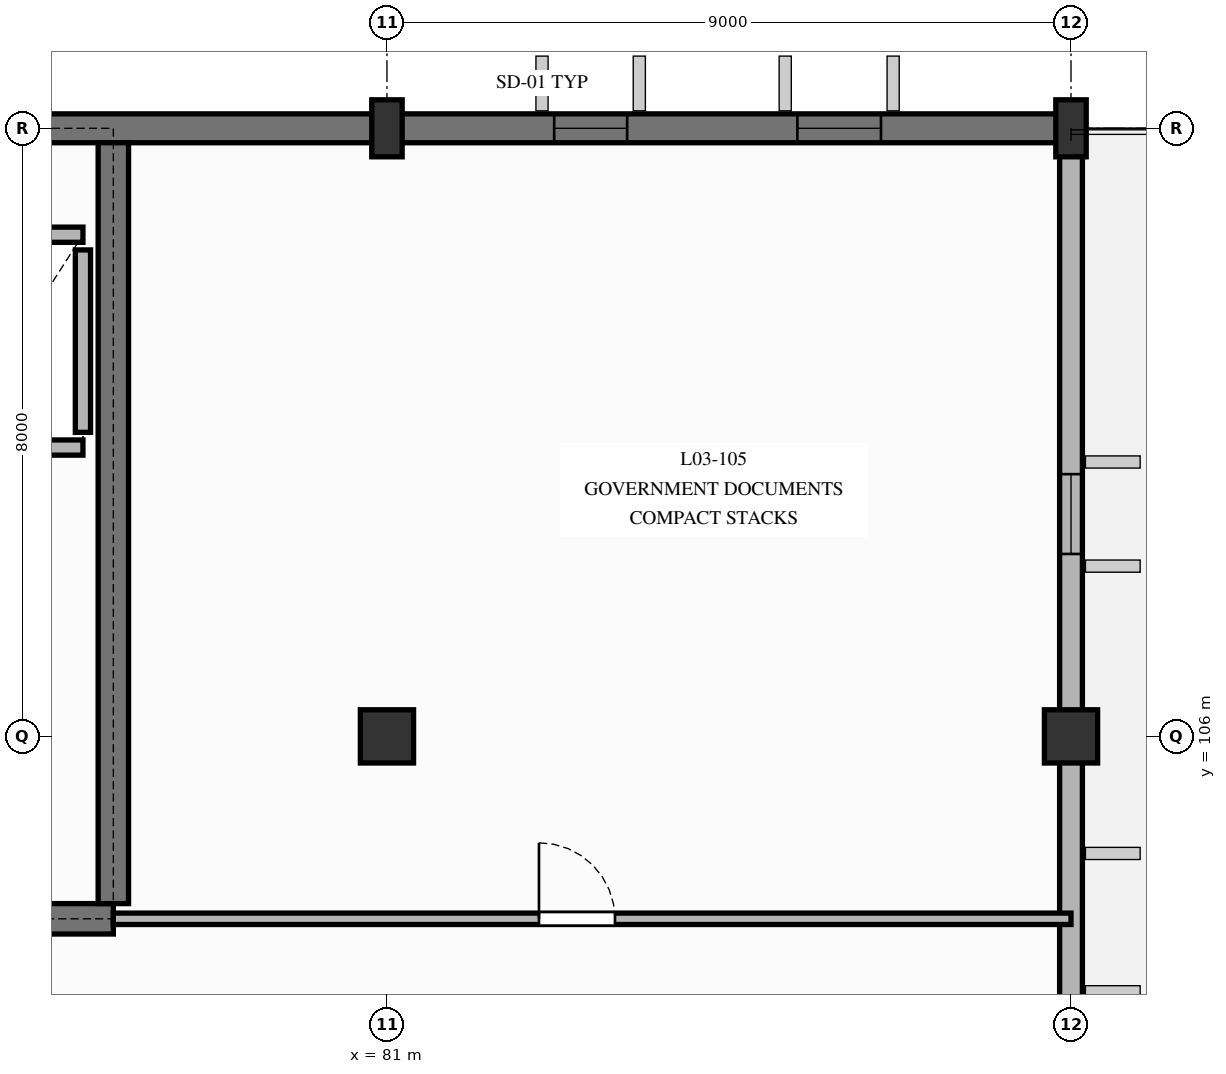
"""IFC4 building model, lengths in metres.
Left out: names, types, materials, properties, quantities, classifications, styles, units other than length and angle.
Written with IfcOpenShell. Run it as: python <this file> out.ifc"""

import sys

from ifc_helpers import new_model, si_unit, direction, frame, frame_2d, origin, origin_2d, place, context, subcontext, project, spatial, rectangle, extrude, element, fill, save


model = new_model("IFC4")
c1 = context("Model", 3, precision=1e-05, world=origin(), true_north=direction((0.0, 1.0)))
c2 = subcontext(c1, "Body", "Model", "MODEL_VIEW")
j1 = project(units=[si_unit("LENGTHUNIT", "METRE"), si_unit("PLANEANGLEUNIT", "RADIAN")], contexts=[c1])
p1 = place(None, origin())
s1 = spatial("IfcSite", under=j1, at=p1, CompositionType="ELEMENT")
p2 = place(p1, origin())
s2 = spatial("IfcBuilding", under=s1, at=p2, CompositionType="ELEMENT")
p3 = place(p2, frame((0.0, 0.0, 12.78)))
s3 = spatial("IfcBuildingStorey", under=s2, at=p3, CompositionType="ELEMENT", Elevation=12.78)
p4 = place(p3, frame((81.0, 106.0, 0.0), z_axis=(0.0, 0.0, 1.0), x_axis=(1.0, 0.0, 0.0)))
e1 = element("IfcColumn", 1, at=p4, inside=s3, PredefinedType="COLUMN", context=c2, shape_type="SweptSolid", body=[
    extrude(rectangle(XDim=0.7, YDim=0.7, at=origin_2d()), origin(), (0.0, 0.0, 1.0), 3.74),
])
p5 = place(p3, frame((81.0, 114.0, 0.0), z_axis=(0.0, 0.0, 1.0), x_axis=(0.0, 1.0, 0.0)))
e2 = element("IfcColumn", 2, at=p5, inside=s3, PredefinedType="COLUMN", context=c2, shape_type="SweptSolid", body=[
    extrude(rectangle(XDim=0.4, YDim=0.75, at=origin_2d()), origin(), (0.0, 0.0, 1.0), 3.74),
])
p6 = place(p3, frame((90.0, 106.0, 0.0), z_axis=(0.0, 0.0, 1.0), x_axis=(1.0, 0.0, 0.0)))
e3 = element("IfcColumn", 3, at=p6, inside=s3, PredefinedType="COLUMN", context=c2, shape_type="SweptSolid", body=[
    extrude(rectangle(XDim=0.7, YDim=0.7, at=origin_2d()), origin(), (0.0, 0.0, 1.0), 3.74),
])
p7 = place(p3, frame((90.0, 114.0, 0.0), z_axis=(0.0, 0.0, 1.0), x_axis=(0.0, 1.0, 0.0)))
e4 = element("IfcColumn", 4, at=p7, inside=s3, PredefinedType="COLUMN", context=c2, shape_type="SweptSolid", body=[
    extrude(rectangle(XDim=0.4, YDim=0.75, at=origin_2d()), origin(), (0.0, 0.0, 1.0), 3.74),
])
p8 = place(p3, frame((72.0, 114.0, 0.0), z_axis=(0.0, 0.0, 1.0), x_axis=(1.0, 0.0, 0.0)))
e5 = element("IfcWall", 5, at=p8, inside=s3, PredefinedType="SOLIDWALL", context=c2, shape_type="SweptSolid", body=[
    extrude(rectangle(XDim=9.0, YDim=0.38, at=frame_2d((4.5, 0.0))), origin(), (0.0, 0.0, 1.0), 3.42),
])
p9 = place(p3, frame((81.0, 114.0, 0.0), z_axis=(0.0, 0.0, 1.0), x_axis=(1.0, 0.0, 0.0)))
e6 = element("IfcWall", 6, at=p9, inside=s3, PredefinedType="SOLIDWALL", context=c2, shape_type="SweptSolid", body=[
    extrude(rectangle(XDim=9.0, YDim=0.38, at=frame_2d((4.5, 0.0))), origin(), (0.0, 0.0, 1.0), 3.42),
])
p10 = place(p9, frame((2.2, 0.0, 0.815)))
e7 = element("IfcOpeningElement", 7, at=p10, cuts=e6, PredefinedType="OPENING", context=c2, shape_type="SweptSolid", body=[
    extrude(rectangle(XDim=0.96, YDim=1.95, at=frame_2d((0.48, 0.975))), frame((0.0, 0.2, 0.0), z_axis=(0.0, -1.0, 0.0), x_axis=(1.0, 0.0, 0.0)), (0.0, 0.0, 1.0), 0.4),
])
p11 = place(p9, frame((5.4, 0.0, 1.05)))
e8 = element("IfcOpeningElement", 8, at=p11, cuts=e6, PredefinedType="OPENING", context=c2, shape_type="SweptSolid", body=[
    extrude(rectangle(XDim=1.1, YDim=1.65, at=frame_2d((0.55, 0.825))), frame((0.0, 0.2, 0.0), z_axis=(0.0, -1.0, 0.0), x_axis=(1.0, 0.0, 0.0)), (0.0, 0.0, 1.0), 0.4),
])
p12 = place(p3, frame((90.0, 95.6, 0.0), z_axis=(0.0, 0.0, 1.0), x_axis=(0.0, 1.0, 0.0)))
e9 = element("IfcWall", 9, at=p12, inside=s3, PredefinedType="SOLIDWALL", context=c2, shape_type="SweptSolid", body=[
    extrude(rectangle(XDim=18.4, YDim=0.3, at=frame_2d((9.2, 0.0))), origin(), (0.0, 0.0, 1.0), 2.805),
])
p13 = place(p12, frame((4.4, 0.0, 0.0)))
e10 = element("IfcOpeningElement", 10, at=p13, cuts=e9, PredefinedType="OPENING", context=c2, shape_type="SweptSolid", body=[
    extrude(rectangle(XDim=1.6, YDim=2.25, at=frame_2d((0.8, 1.125))), frame((0.0, 0.16, 0.0), z_axis=(0.0, -1.0, 0.0), x_axis=(1.0, 0.0, 0.0)), (0.0, 0.0, 1.0), 0.32),
])
p14 = place(p12, frame((12.8, 0.0, 0.935)))
e11 = element("IfcOpeningElement", 11, at=p14, cuts=e9, PredefinedType="OPENING", context=c2, shape_type="SweptSolid", body=[
    extrude(rectangle(XDim=1.05, YDim=1.75, at=frame_2d((0.525, 0.875))), frame((0.0, 0.16, 0.0), z_axis=(0.0, -1.0, 0.0), x_axis=(1.0, 0.0, 0.0)), (0.0, 0.0, 1.0), 0.32),
])
p15 = place(p3, frame((64.2, 103.6, 0.0), z_axis=(0.0, 0.0, 1.0), x_axis=(1.0, 0.0, 0.0)))
e12 = element("IfcWall", 12, at=p15, inside=s3, PredefinedType="SHEAR", context=c2, shape_type="SweptSolid", body=[
    extrude(rectangle(XDim=13.2, YDim=0.4, at=frame_2d((6.6, 0.0))), origin(), (0.0, 0.0, 1.0), 3.42),
])
p16 = place(p15, frame((5.8, 0.0, 0.0)))
e13 = element("IfcOpeningElement", 13, at=p16, cuts=e12, PredefinedType="OPENING", context=c2, shape_type="SweptSolid", body=[
    extrude(rectangle(XDim=1.5, YDim=2.2, at=frame_2d((0.75, 1.1))), frame((0.0, 0.21, 0.0), z_axis=(0.0, -1.0, 0.0), x_axis=(1.0, 0.0, 0.0)), (0.0, 0.0, 1.0), 0.42),
])
p17 = place(p3, frame((77.4, 103.8, 0.0), z_axis=(0.0, 0.0, 1.0), x_axis=(0.0, 1.0, 0.0)))
e14 = element("IfcWall", 14, at=p17, inside=s3, PredefinedType="SHEAR", context=c2, shape_type="SweptSolid", body=[
    extrude(rectangle(XDim=10.01, YDim=0.4, at=frame_2d((5.005, 0.0))), origin(), (0.0, 0.0, 1.0), 3.42),
])
p18 = place(p3, frame((75.2, 109.8, 0.0), z_axis=(0.0, 0.0, 1.0), x_axis=(1.0, 0.0, 0.0)))
e15 = element("IfcWall", 15, at=p18, inside=s3, PredefinedType="PARTITIONING", context=c2, shape_type="SweptSolid", body=[
    extrude(rectangle(XDim=1.8, YDim=0.2, at=frame_2d((0.9, 0.0))), origin(), (0.0, 0.0, 1.0), 3.42),
])
p19 = place(p18, frame((0.45, 0.0, 0.0)))
e16 = element("IfcOpeningElement", 16, at=p19, cuts=e15, PredefinedType="OPENING", context=c2, shape_type="SweptSolid", body=[
    extrude(rectangle(XDim=0.9, YDim=2.1, at=frame_2d((0.45, 1.05))), frame((0.0, 0.11, 0.0), z_axis=(0.0, -1.0, 0.0), x_axis=(1.0, 0.0, 0.0)), (0.0, 0.0, 1.0), 0.22),
])
p20 = place(p3, frame((75.2, 112.6, 0.0), z_axis=(0.0, 0.0, 1.0), x_axis=(1.0, 0.0, 0.0)))
e17 = element("IfcWall", 17, at=p20, inside=s3, PredefinedType="PARTITIONING", context=c2, shape_type="SweptSolid", body=[
    extrude(rectangle(XDim=1.8, YDim=0.2, at=frame_2d((0.9, 0.0))), origin(), (0.0, 0.0, 1.0), 3.42),
])
p21 = place(p3, frame((77.0, 110.0, 0.0), z_axis=(0.0, 0.0, 1.0), x_axis=(0.0, 1.0, 0.0)))
e18 = element("IfcWall", 18, at=p21, inside=s3, PredefinedType="PARTITIONING", context=c2, shape_type="SweptSolid", body=[
    extrude(rectangle(XDim=2.4, YDim=0.2, at=frame_2d((1.2, 0.0))), origin(), (0.0, 0.0, 1.0), 3.42),
])
p22 = place(p3, frame((77.4, 103.6, 0.0), z_axis=(0.0, 0.0, 1.0), x_axis=(1.0, 0.0, 0.0)))
e19 = element("IfcWall", 19, at=p22, inside=s3, PredefinedType="PARTITIONING", context=c2, shape_type="SweptSolid", body=[
    extrude(rectangle(XDim=12.6, YDim=0.15, at=frame_2d((6.3, 0.0))), origin(), (0.0, 0.0, 1.0), 3.42),
])
p23 = place(p22, frame((5.6, 0.0, 0.0)))
e20 = element("IfcOpeningElement", 20, at=p23, cuts=e19, PredefinedType="OPENING", context=c2, shape_type="SweptSolid", body=[
    extrude(rectangle(XDim=1.0, YDim=2.15, at=frame_2d((0.5, 1.075))), frame((0.0, 0.085, 0.0), z_axis=(0.0, -1.0, 0.0), x_axis=(1.0, 0.0, 0.0)), (0.0, 0.0, 1.0), 0.17),
])
p24 = place(p10, origin())
e21 = element("IfcWindow", 21, at=p24, inside=s3, PartitioningType="SINGLE_PANEL", PredefinedType="WINDOW", context=c2, shape_type="SweptSolid", body=[
    extrude(rectangle(XDim=0.96, YDim=1.95, at=frame_2d((0.48, 0.975))), frame((0.0, 0.03, 0.0), z_axis=(0.0, -1.0, 0.0), x_axis=(1.0, 0.0, 0.0)), (0.0, 0.0, 1.0), 0.06),
])
fill(e7, e21)
p25 = place(p11, origin())
e22 = element("IfcWindow", 22, at=p25, inside=s3, PartitioningType="SINGLE_PANEL", PredefinedType="WINDOW", context=c2, shape_type="SweptSolid", body=[
    extrude(rectangle(XDim=1.1, YDim=1.65, at=frame_2d((0.55, 0.825))), frame((0.0, 0.03, 0.0), z_axis=(0.0, -1.0, 0.0), x_axis=(1.0, 0.0, 0.0)), (0.0, 0.0, 1.0), 0.06),
])
fill(e8, e22)
p26 = place(p14, origin())
e23 = element("IfcWindow", 23, at=p26, inside=s3, PartitioningType="SINGLE_PANEL", PredefinedType="WINDOW", context=c2, shape_type="SweptSolid", body=[
    extrude(rectangle(XDim=1.05, YDim=1.75, at=frame_2d((0.525, 0.875))), frame((0.0, 0.03, 0.0), z_axis=(0.0, -1.0, 0.0), x_axis=(1.0, 0.0, 0.0)), (0.0, 0.0, 1.0), 0.06),
])
fill(e11, e23)
p27 = place(p23, origin())
e24 = element("IfcDoor", 24, at=p27, inside=s3, OperationType="SINGLE_SWING_LEFT", PredefinedType="DOOR", context=c2, shape_type="SweptSolid", body=[
    extrude(rectangle(XDim=1.0, YDim=2.15, at=frame_2d((0.5, 1.075))), frame((0.0, 0.025, 0.0), z_axis=(0.0, -1.0, 0.0), x_axis=(1.0, 0.0, 0.0)), (0.0, 0.0, 1.0), 0.05),
])
fill(e20, e24)
save(model, sys.argv[1])
